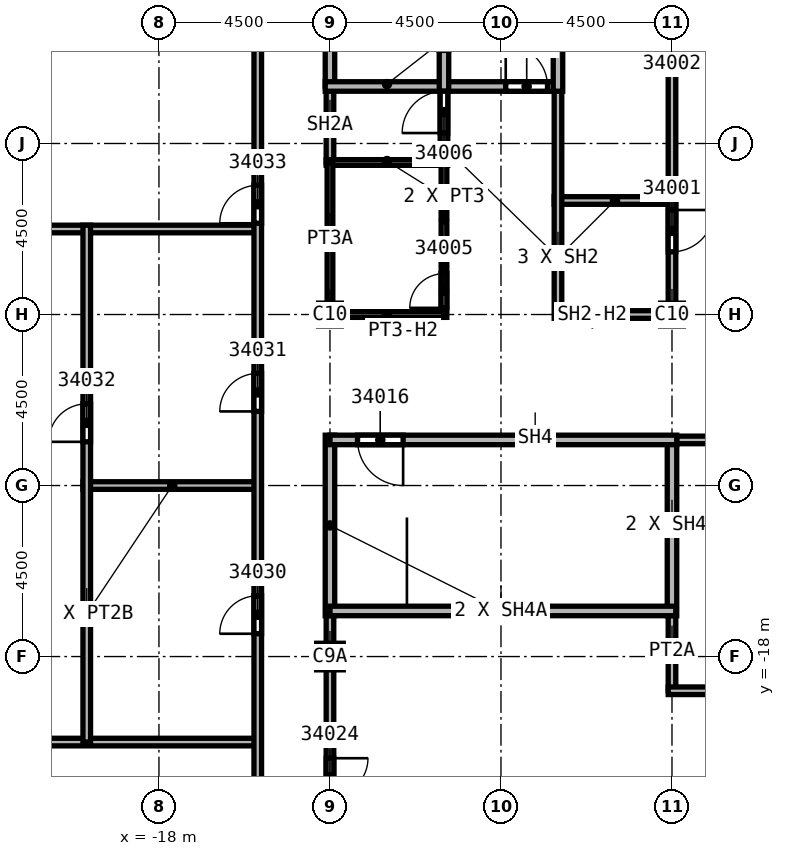
"""IFC4 building model, lengths in metres.
Left out: names, types, materials, properties, quantities, classifications, styles, units other than length and angle.
Written with IfcOpenShell. Run it as: python <this file> out.ifc"""

import sys

from ifc_helpers import new_model, si_unit, direction, frame, frame_2d, origin, origin_2d, place, context, subcontext, project, spatial, rectangle, extrude, element, fill, save


model = new_model("IFC4")
c1 = context("Model", 3, precision=1e-05, world=origin(), true_north=direction((0.0, 1.0)))
c2 = subcontext(c1, "Body", "Model", "MODEL_VIEW")
j1 = project(units=[si_unit("LENGTHUNIT", "METRE"), si_unit("PLANEANGLEUNIT", "RADIAN")], contexts=[c1])
p1 = place(None, origin())
s1 = spatial("IfcSite", under=j1, at=p1, CompositionType="ELEMENT")
p2 = place(p1, origin())
s2 = spatial("IfcBuilding", under=s1, at=p2, CompositionType="ELEMENT")
p3 = place(p2, frame((0.0, 0.0, 366.0)))
s3 = spatial("IfcBuildingStorey", under=s2, at=p3, CompositionType="ELEMENT", Elevation=366.0)
p4 = place(p3, frame((-13.5, -18.0, 0.0), z_axis=(0.0, 0.0, 1.0), x_axis=(1.0, 0.0, 0.0)))
e1 = element("IfcColumn", 1, at=p4, inside=s3, PredefinedType="COLUMN", context=c2, shape_type="SweptSolid", body=[
    extrude(rectangle(XDim=0.7, YDim=0.7, at=origin_2d()), origin(), (0.0, 0.0, 1.0), 9.532),
])
for number, where, z_axis, x_axis in (
    (2, (-4.5, -9.0, 0.0), (0.0, 0.0, 1.0), (1.0, 0.0, 0.0)),
    (3, (-13.5, -9.0, 0.0), (0.0, 0.0, 1.0), (1.0, 0.0, 0.0)),
):
    element("IfcColumn", number, at=place(p3, frame(where, z_axis=z_axis, x_axis=x_axis)), inside=s3, PredefinedType="COLUMN", context=c2, shape_type="SweptSolid", body=[
        extrude(rectangle(XDim=0.6, YDim=0.6, at=origin_2d()), origin(), (0.0, 0.0, 1.0), 9.6),
    ])
p5 = place(p3, frame((-26.736, -6.75, 0.0), z_axis=(0.0, 0.0, 1.0), x_axis=(1.0, 0.0, 0.0)))
e4 = element("IfcWall", 4, at=p5, inside=s3, PredefinedType="PARTITIONING", context=c2, shape_type="SweptSolid", body=[
    extrude(rectangle(XDim=11.336, YDim=0.2, at=frame_2d((5.668, 0.0))), origin(), (0.0, 0.0, 1.0), 9.115),
])
p6 = place(p3, frame((-24.486, -20.25, 0.0), z_axis=(0.0, 0.0, 1.0), x_axis=(1.0, 0.0, 0.0)))
e5 = element("IfcWall", 5, at=p6, inside=s3, PredefinedType="PARTITIONING", context=c2, shape_type="SweptSolid", body=[
    extrude(rectangle(XDim=9.086, YDim=0.2, at=frame_2d((4.543, 0.0))), origin(), (0.0, 0.0, 1.0), 5.76),
])
p7 = place(p3, frame((-20.0, -13.5, 0.0), z_axis=(0.0, 0.0, 1.0), x_axis=(1.0, 0.0, 0.0)))
e6 = element("IfcWall", 6, at=p7, inside=s3, PredefinedType="PARTITIONING", context=c2, shape_type="SweptSolid", body=[
    extrude(rectangle(XDim=4.6, YDim=0.2, at=frame_2d((2.3, 0.0))), origin(), (0.0, 0.0, 1.0), 9.115),
])
p8 = place(p3, frame((-19.9, -20.25, 0.0), z_axis=(0.0, 0.0, 1.0), x_axis=(0.0, 1.0, 0.0)))
e7 = element("IfcWall", 7, at=p8, inside=s3, PredefinedType="PARTITIONING", context=c2, shape_type="SweptSolid", body=[
    extrude(rectangle(XDim=13.6, YDim=0.2, at=frame_2d((6.8, 0.0))), origin(), (0.0, 0.0, 1.0), 9.115),
])
p9 = place(p8, frame((7.9, 0.0, 0.0)))
e8 = element("IfcOpeningElement", 8, at=p9, cuts=e7, PredefinedType="OPENING", context=c2, shape_type="SweptSolid", body=[
    extrude(rectangle(XDim=1.0, YDim=2.1, at=frame_2d((0.5, 1.05))), frame((0.0, 0.1, 0.0), z_axis=(0.0, -1.0, 0.0), x_axis=(1.0, 0.0, 0.0)), (0.0, 0.0, 1.0), 0.2),
])
p10 = place(p3, frame((-15.4, -27.45, 0.0), z_axis=(0.0, 0.0, 1.0), x_axis=(0.0, 1.0, 0.0)))
e9 = element("IfcWall", 9, at=p10, inside=s3, PredefinedType="PARTITIONING", context=c2, shape_type="SweptSolid", body=[
    extrude(rectangle(XDim=41.05, YDim=0.2, at=frame_2d((20.525, 0.0))), origin(), (0.0, 0.0, 1.0), 5.76),
])
p11 = place(p10, frame((36.45, 0.0, 0.0)))
e10 = element("IfcOpeningElement", 10, at=p11, cuts=e9, PredefinedType="OPENING", context=c2, shape_type="SweptSolid", body=[
    extrude(rectangle(XDim=1.0, YDim=2.1, at=frame_2d((0.5, 1.05))), frame((0.0, 0.1, 0.0), z_axis=(0.0, -1.0, 0.0), x_axis=(1.0, 0.0, 0.0)), (0.0, 0.0, 1.0), 0.2),
])
p12 = place(p10, frame((4.0, 0.0, 0.0)))
e11 = element("IfcOpeningElement", 11, at=p12, cuts=e9, PredefinedType="OPENING", context=c2, shape_type="SweptSolid", body=[
    extrude(rectangle(XDim=1.0, YDim=2.1, at=frame_2d((0.5, 1.05))), frame((0.0, 0.1, 0.0), z_axis=(0.0, -1.0, 0.0), x_axis=(1.0, 0.0, 0.0)), (0.0, 0.0, 1.0), 0.2),
])
p13 = place(p10, frame((10.05, 0.0, 0.0)))
e12 = element("IfcOpeningElement", 12, at=p13, cuts=e9, PredefinedType="OPENING", context=c2, shape_type="SweptSolid", body=[
    extrude(rectangle(XDim=1.0, YDim=2.1, at=frame_2d((0.5, 1.05))), frame((0.0, 0.1, 0.0), z_axis=(0.0, -1.0, 0.0), x_axis=(1.0, 0.0, 0.0)), (0.0, 0.0, 1.0), 0.2),
])
p14 = place(p10, frame((15.9, 0.0, 0.0)))
e13 = element("IfcOpeningElement", 13, at=p14, cuts=e9, PredefinedType="OPENING", context=c2, shape_type="SweptSolid", body=[
    extrude(rectangle(XDim=1.0, YDim=2.1, at=frame_2d((0.5, 1.05))), frame((0.0, 0.1, 0.0), z_axis=(0.0, -1.0, 0.0), x_axis=(1.0, 0.0, 0.0)), (0.0, 0.0, 1.0), 0.2),
])
p15 = place(p10, frame((20.85, 0.0, 0.0)))
e14 = element("IfcOpeningElement", 14, at=p15, cuts=e9, PredefinedType="OPENING", context=c2, shape_type="SweptSolid", body=[
    extrude(rectangle(XDim=1.0, YDim=2.1, at=frame_2d((0.5, 1.05))), frame((0.0, 0.1, 0.0), z_axis=(0.0, -1.0, 0.0), x_axis=(1.0, 0.0, 0.0)), (0.0, 0.0, 1.0), 0.2),
])
p16 = place(p3, frame((-13.5, -16.675, 0.0), z_axis=(0.0, 0.0, 1.0), x_axis=(0.0, -1.0, 0.0)))
e15 = element("IfcWall", 15, at=p16, inside=s3, PredefinedType="PARTITIONING", context=c2, shape_type="SweptSolid", body=[
    extrude(rectangle(XDim=10.775, YDim=0.2, at=frame_2d((5.387, 0.0))), origin(), (0.0, 0.0, 1.0), 4.916),
])
p17 = place(p16, frame((4.0, 0.0, 0.0)))
e16 = element("IfcOpeningElement", 16, at=p17, cuts=e15, PredefinedType="OPENING", context=c2, shape_type="SweptSolid", body=[
    extrude(rectangle(XDim=1.0, YDim=2.1, at=frame_2d((0.5, 1.05))), frame((0.0, 0.1, 0.0), z_axis=(0.0, -1.0, 0.0), x_axis=(1.0, 0.0, 0.0)), (0.0, 0.0, 1.0), 0.2),
])
p18 = place(p3, frame((-4.5, -18.9, 0.0), z_axis=(0.0, 0.0, 1.0), x_axis=(0.0, 1.0, 0.0)))
e17 = element("IfcWall", 17, at=p18, inside=s3, PredefinedType="PARTITIONING", context=c2, shape_type="SweptSolid", body=[
    extrude(rectangle(XDim=2.1, YDim=0.2, at=frame_2d((1.05, 0.0))), origin(), (0.0, 0.0, 1.0), 5.76),
])
p19 = place(p3, frame((4.5, -18.9, 0.0), z_axis=(0.0, 0.0, 1.0), x_axis=(-1.0, 0.0, 0.0)))
e18 = element("IfcWall", 18, at=p19, inside=s3, PredefinedType="PARTITIONING", context=c2, shape_type="SweptSolid", body=[
    extrude(rectangle(XDim=9.1, YDim=0.2, at=frame_2d((4.55, 0.0))), origin(), (0.0, 0.0, 1.0), 5.76),
])
p20 = place(p3, frame((4.625, -12.3, 0.0), z_axis=(0.0, 0.0, 1.0), x_axis=(-1.0, 0.0, 0.0)))
e19 = element("IfcWall", 19, at=p20, inside=s3, PredefinedType="PARTITIONING", context=c2, shape_type="SweptSolid", body=[
    extrude(rectangle(XDim=9.25, YDim=0.2, at=frame_2d((4.625, 0.0))), origin(), (0.0, 0.0, 1.0), 9.15),
])
p21 = place(p20, frame((1.45, 0.0, 0.0)))
e20 = element("IfcOpeningElement", 20, at=p21, cuts=e19, PredefinedType="OPENING", context=c2, shape_type="SweptSolid", body=[
    extrude(rectangle(XDim=1.0, YDim=2.1, at=frame_2d((0.5, 1.05))), frame((0.0, 0.1, 0.0), z_axis=(0.0, -1.0, 0.0), x_axis=(1.0, 0.0, 0.0)), (0.0, 0.0, 1.0), 0.2),
])
p22 = place(p3, frame((-13.5, -5.0, 0.0), z_axis=(0.0, 0.0, 1.0), x_axis=(0.0, 1.0, 0.0)))
e21 = element("IfcWall", 21, at=p22, inside=s3, PredefinedType="SOLIDWALL", context=c2, shape_type="SweptSolid", body=[
    extrude(rectangle(XDim=2.0, YDim=0.2, at=frame_2d((1.0, 0.0))), origin(), (0.0, 0.0, 1.0), 5.76),
])
p23 = place(p3, frame((-10.5, -5.075, 0.0), z_axis=(0.0, 0.0, 1.0), x_axis=(0.0, 1.0, 0.0)))
e22 = element("IfcWall", 22, at=p23, inside=s3, PredefinedType="SOLIDWALL", context=c2, shape_type="SweptSolid", body=[
    extrude(rectangle(XDim=2.2, YDim=0.2, at=frame_2d((1.1, 0.0))), origin(), (0.0, 0.0, 1.0), 9.15),
])
p24 = place(p23, frame((0.85, 0.0, 0.0)))
e23 = element("IfcOpeningElement", 23, at=p24, cuts=e22, PredefinedType="OPENING", context=c2, shape_type="SweptSolid", body=[
    extrude(rectangle(XDim=1.1, YDim=2.1, at=frame_2d((0.55, 1.05))), frame((0.0, 0.1, 0.0), z_axis=(0.0, -1.0, 0.0), x_axis=(1.0, 0.0, 0.0)), (0.0, 0.0, 1.0), 0.2),
])
p25 = place(p3, frame((-7.6, -6.0, 0.0), z_axis=(0.0, 0.0, 1.0), x_axis=(1.0, 0.0, 0.0)))
e24 = element("IfcWall", 24, at=p25, inside=s3, PredefinedType="SOLIDWALL", context=c2, shape_type="SweptSolid", body=[
    extrude(rectangle(XDim=3.2, YDim=0.2, at=frame_2d((1.6, 0.0))), origin(), (0.0, 0.0, 1.0), 9.15),
])
p26 = place(p3, frame((-7.5, -9.1, 0.0), z_axis=(0.0, 0.0, 1.0), x_axis=(0.0, 1.0, 0.0)))
e25 = element("IfcWall", 25, at=p26, inside=s3, PredefinedType="SOLIDWALL", context=c2, shape_type="SweptSolid", body=[
    extrude(rectangle(XDim=6.225, YDim=0.2, at=frame_2d((3.113, 0.0))), origin(), (0.0, 0.0, 1.0), 9.15),
])
p27 = place(p3, frame((-4.5, -9.0, 0.0), z_axis=(0.0, 0.0, 1.0), x_axis=(-1.0, 0.0, 0.0)))
e26 = element("IfcWall", 26, at=p27, inside=s3, PredefinedType="SOLIDWALL", context=c2, shape_type="SweptSolid", body=[
    extrude(rectangle(XDim=3.0, YDim=0.2, at=frame_2d((1.5, 0.0))), origin(), (0.0, 0.0, 1.0), 8.754),
])
p28 = place(p3, frame((-4.5, 9.1, 0.0), z_axis=(0.0, 0.0, 1.0), x_axis=(0.0, -1.0, 0.0)))
e27 = element("IfcWall", 27, at=p28, inside=s3, PredefinedType="SOLIDWALL", context=c2, shape_type="SweptSolid", body=[
    extrude(rectangle(XDim=18.2, YDim=0.2, at=frame_2d((9.1, 0.0))), origin(), (0.0, 0.0, 1.0), 8.838),
])
p29 = place(p28, frame((15.35, 0.0, 0.0)))
e28 = element("IfcOpeningElement", 28, at=p29, cuts=e27, PredefinedType="OPENING", context=c2, shape_type="SweptSolid", body=[
    extrude(rectangle(XDim=1.1, YDim=2.1, at=frame_2d((0.55, 1.05))), frame((0.0, 0.1, 0.0), z_axis=(0.0, -1.0, 0.0), x_axis=(1.0, 0.0, 0.0)), (0.0, 0.0, 1.0), 0.2),
])
p30 = place(p28, frame((9.85, 0.0, 0.0)))
e29 = element("IfcOpeningElement", 29, at=p30, cuts=e27, PredefinedType="OPENING", context=c2, shape_type="SweptSolid", body=[
    extrude(rectangle(XDim=1.1, YDim=2.1, at=frame_2d((0.55, 1.05))), frame((0.0, 0.1, 0.0), z_axis=(0.0, -1.0, 0.0), x_axis=(1.0, 0.0, 0.0)), (0.0, 0.0, 1.0), 0.2),
])
p31 = place(p3, frame((-13.5, -3.0, 0.0), z_axis=(0.0, 0.0, 1.0), x_axis=(0.0, 1.0, 0.0)))
e30 = element("IfcWall", 30, at=p31, inside=s3, PredefinedType="SOLIDWALL", context=c2, shape_type="SweptSolid", body=[
    extrude(rectangle(XDim=6.0, YDim=0.25, at=frame_2d((3.0, 0.0))), origin(), (0.0, 0.0, 1.0), 5.76),
])
p32 = place(p3, frame((-13.625, -3.0, 0.0), z_axis=(0.0, 0.0, 1.0), x_axis=(1.0, 0.0, 0.0)))
e31 = element("IfcWall", 31, at=p32, inside=s3, PredefinedType="SOLIDWALL", context=c2, shape_type="SweptSolid", body=[
    extrude(rectangle(XDim=6.125, YDim=0.25, at=frame_2d((3.062, 0.0))), origin(), (0.0, 0.0, 1.0), 9.15),
])
p33 = place(p32, frame((4.75, 0.0, 0.0)))
e32 = element("IfcOpeningElement", 32, at=p33, cuts=e31, PredefinedType="OPENING", context=c2, shape_type="SweptSolid", body=[
    extrude(rectangle(XDim=1.1, YDim=2.1, at=frame_2d((0.55, 1.05))), frame((0.0, 0.125, 0.0), z_axis=(0.0, -1.0, 0.0), x_axis=(1.0, 0.0, 0.0)), (0.0, 0.0, 1.0), 0.25),
])
p34 = place(p3, frame((-10.5, -3.125, 0.0), z_axis=(0.0, 0.0, 1.0), x_axis=(0.0, 1.0, 0.0)))
e33 = element("IfcWall", 33, at=p34, inside=s3, PredefinedType="SOLIDWALL", context=c2, shape_type="SweptSolid", body=[
    extrude(rectangle(XDim=6.25, YDim=0.25, at=frame_2d((3.125, 0.0))), origin(), (0.0, 0.0, 1.0), 9.15),
])
p35 = place(p34, frame((1.075, 0.0, 0.0)))
e34 = element("IfcOpeningElement", 34, at=p35, cuts=e33, PredefinedType="OPENING", context=c2, shape_type="SweptSolid", body=[
    extrude(rectangle(XDim=1.1, YDim=2.1, at=frame_2d((0.55, 1.05))), frame((0.0, 0.125, 0.0), z_axis=(0.0, -1.0, 0.0), x_axis=(1.0, 0.0, 0.0)), (0.0, 0.0, 1.0), 0.25),
])
p36 = place(p34, frame((4.075, 0.0, 0.0)))
e35 = element("IfcOpeningElement", 35, at=p36, cuts=e33, PredefinedType="OPENING", context=c2, shape_type="SweptSolid", body=[
    extrude(rectangle(XDim=1.1, YDim=2.1, at=frame_2d((0.55, 1.05))), frame((0.0, 0.125, 0.0), z_axis=(0.0, -1.0, 0.0), x_axis=(1.0, 0.0, 0.0)), (0.0, 0.0, 1.0), 0.25),
])
p37 = place(p3, frame((-7.5, -3.125, 0.0), z_axis=(0.0, 0.0, 1.0), x_axis=(0.0, 1.0, 0.0)))
e36 = element("IfcWall", 36, at=p37, inside=s3, PredefinedType="SOLIDWALL", context=c2, shape_type="SweptSolid", body=[
    extrude(rectangle(XDim=6.25, YDim=0.25, at=frame_2d((3.125, 0.0))), origin(), (0.0, 0.0, 1.0), 9.15),
])
p38 = place(p3, frame((-13.5, -12.175, 0.0), z_axis=(0.0, 0.0, 1.0), x_axis=(0.0, -1.0, 0.0)))
e37 = element("IfcWall", 37, at=p38, inside=s3, PredefinedType="SOLIDWALL", context=c2, shape_type="SweptSolid", body=[
    extrude(rectangle(XDim=4.75, YDim=0.25, at=frame_2d((2.375, 0.0))), origin(), (0.0, 0.0, 1.0), 5.76),
])
p39 = place(p3, frame((-4.5, -12.3, 0.0), z_axis=(0.0, 0.0, 1.0), x_axis=(0.0, -1.0, 0.0)))
e38 = element("IfcWall", 38, at=p39, inside=s3, PredefinedType="SOLIDWALL", context=c2, shape_type="SweptSolid", body=[
    extrude(rectangle(XDim=4.625, YDim=0.25, at=frame_2d((2.312, 0.0))), origin(), (0.0, 0.0, 1.0), 9.744),
])
p40 = place(p3, frame((-4.4, -16.8, 0.0), z_axis=(0.0, 0.0, 1.0), x_axis=(-1.0, 0.0, 0.0)))
e39 = element("IfcWall", 39, at=p40, inside=s3, PredefinedType="SOLIDWALL", context=c2, shape_type="SweptSolid", body=[
    extrude(rectangle(XDim=9.1, YDim=0.25, at=frame_2d((4.55, 0.0))), origin(), (0.0, 0.0, 1.0), 5.76),
])
p41 = place(p3, frame((-4.375, -12.3, 0.0), z_axis=(0.0, 0.0, 1.0), x_axis=(-1.0, 0.0, 0.0)))
e40 = element("IfcWall", 40, at=p41, inside=s3, PredefinedType="SOLIDWALL", context=c2, shape_type="SweptSolid", body=[
    extrude(rectangle(XDim=9.125, YDim=0.25, at=frame_2d((4.562, 0.0))), origin(), (0.0, 0.0, 1.0), 9.15),
])
p42 = place(p41, frame((7.2, 0.0, 0.0)))
e41 = element("IfcOpeningElement", 41, at=p42, cuts=e40, PredefinedType="OPENING", context=c2, shape_type="SweptSolid", body=[
    extrude(rectangle(XDim=1.2, YDim=2.1, at=frame_2d((0.6, 1.05))), frame((0.0, 0.125, 0.0), z_axis=(0.0, -1.0, 0.0), x_axis=(1.0, 0.0, 0.0)), (0.0, 0.0, 1.0), 0.25),
])
p43 = place(p3, frame((-13.6, -5.0, 0.0), z_axis=(0.0, 0.0, 1.0), x_axis=(1.0, 0.0, 0.0)))
e42 = element("IfcWall", 42, at=p43, inside=s3, PredefinedType="PARTITIONING", context=c2, shape_type="SweptSolid", body=[
    extrude(rectangle(XDim=3.1, YDim=0.15, at=frame_2d((1.55, 0.0))), origin(), (0.0, 0.0, 1.0), 9.15),
])
p44 = place(p3, frame((-13.5, -9.075, 0.0), z_axis=(0.0, 0.0, 1.0), x_axis=(0.0, 1.0, 0.0)))
e43 = element("IfcWall", 43, at=p44, inside=s3, PredefinedType="PARTITIONING", context=c2, shape_type="SweptSolid", body=[
    extrude(rectangle(XDim=4.075, YDim=0.15, at=frame_2d((2.038, 0.0))), origin(), (0.0, 0.0, 1.0), 5.76),
])
p45 = place(p3, frame((-10.5, -9.075, 0.0), z_axis=(0.0, 0.0, 1.0), x_axis=(0.0, 1.0, 0.0)))
e44 = element("IfcWall", 44, at=p45, inside=s3, PredefinedType="PARTITIONING", context=c2, shape_type="SweptSolid", body=[
    extrude(rectangle(XDim=4.15, YDim=0.15, at=frame_2d((2.075, 0.0))), origin(), (0.0, 0.0, 1.0), 9.15),
])
p46 = place(p45, frame((0.25, 0.0, 0.0)))
e45 = element("IfcOpeningElement", 45, at=p46, cuts=e44, PredefinedType="OPENING", context=c2, shape_type="SweptSolid", body=[
    extrude(rectangle(XDim=0.9, YDim=2.1, at=frame_2d((0.45, 1.05))), frame((0.0, 0.075, 0.0), z_axis=(0.0, -1.0, 0.0), x_axis=(1.0, 0.0, 0.0)), (0.0, 0.0, 1.0), 0.15),
])
p47 = place(p3, frame((-10.5, -9.0, 0.0), z_axis=(0.0, 0.0, 1.0), x_axis=(-1.0, 0.0, 0.0)))
e46 = element("IfcWall", 46, at=p47, inside=s3, PredefinedType="PARTITIONING", context=c2, shape_type="SweptSolid", body=[
    extrude(rectangle(XDim=3.0, YDim=0.15, at=frame_2d((1.5, 0.0))), origin(), (0.0, 0.0, 1.0), 8.754),
])
p48 = place(p29, origin())
e47 = element("IfcDoor", 47, at=p48, inside=s3, OperationType="SINGLE_SWING_RIGHT", PredefinedType="DOOR", context=c2, shape_type="SweptSolid", body=[
    extrude(rectangle(XDim=1.1, YDim=2.1, at=frame_2d((0.55, 1.05))), frame((0.0, 0.025, 0.0), z_axis=(0.0, -1.0, 0.0), x_axis=(1.0, 0.0, 0.0)), (0.0, 0.0, 1.0), 0.05),
])
fill(e28, e47)
p49 = place(p33, origin())
e48 = element("IfcDoor", 48, at=p49, inside=s3, OperationType="SINGLE_SWING_RIGHT", PredefinedType="DOOR", context=c2, shape_type="SweptSolid", body=[
    extrude(rectangle(XDim=1.1, YDim=2.1, at=frame_2d((0.55, 1.05))), frame((0.0, 0.025, 0.0), z_axis=(0.0, -1.0, 0.0), x_axis=(1.0, 0.0, 0.0)), (0.0, 0.0, 1.0), 0.05),
])
fill(e32, e48)
p50 = place(p46, origin())
e49 = element("IfcDoor", 49, at=p50, inside=s3, OperationType="SINGLE_SWING_RIGHT", PredefinedType="DOOR", context=c2, shape_type="SweptSolid", body=[
    extrude(rectangle(XDim=0.9, YDim=2.1, at=frame_2d((0.45, 1.05))), frame((0.0, 0.025, 0.0), z_axis=(0.0, -1.0, 0.0), x_axis=(1.0, 0.0, 0.0)), (0.0, 0.0, 1.0), 0.05),
])
fill(e45, e49)
p51 = place(p24, origin())
e50 = element("IfcDoor", 50, at=p51, inside=s3, OperationType="SINGLE_SWING_LEFT", PredefinedType="DOOR", context=c2, shape_type="SweptSolid", body=[
    extrude(rectangle(XDim=1.1, YDim=2.1, at=frame_2d((0.55, 1.05))), frame((0.0, 0.025, 0.0), z_axis=(0.0, -1.0, 0.0), x_axis=(1.0, 0.0, 0.0)), (0.0, 0.0, 1.0), 0.05),
])
fill(e23, e50)
p52 = place(p42, origin())
e51 = element("IfcDoor", 51, at=p52, inside=s3, OperationType="SINGLE_SWING_LEFT", PredefinedType="DOOR", context=c2, shape_type="SweptSolid", body=[
    extrude(rectangle(XDim=1.2, YDim=2.1, at=frame_2d((0.6, 1.05))), frame((0.0, 0.025, 0.0), z_axis=(0.0, -1.0, 0.0), x_axis=(1.0, 0.0, 0.0)), (0.0, 0.0, 1.0), 0.05),
])
fill(e41, e51)
p53 = place(p17, origin())
e52 = element("IfcDoor", 52, at=p53, inside=s3, OperationType="SINGLE_SWING_LEFT", PredefinedType="DOOR", context=c2, shape_type="SweptSolid", body=[
    extrude(rectangle(XDim=1.0, YDim=2.1, at=frame_2d((0.5, 1.05))), frame((0.0, 0.025, 0.0), z_axis=(0.0, -1.0, 0.0), x_axis=(1.0, 0.0, 0.0)), (0.0, 0.0, 1.0), 0.05),
])
fill(e16, e52)
p54 = place(p13, origin())
e53 = element("IfcDoor", 53, at=p54, inside=s3, OperationType="SINGLE_SWING_LEFT", PredefinedType="DOOR", context=c2, shape_type="SweptSolid", body=[
    extrude(rectangle(XDim=1.0, YDim=2.1, at=frame_2d((0.5, 1.05))), frame((0.0, 0.025, 0.0), z_axis=(0.0, -1.0, 0.0), x_axis=(1.0, 0.0, 0.0)), (0.0, 0.0, 1.0), 0.05),
])
fill(e12, e53)
p55 = place(p14, origin())
e54 = element("IfcDoor", 54, at=p55, inside=s3, OperationType="SINGLE_SWING_RIGHT", PredefinedType="DOOR", context=c2, shape_type="SweptSolid", body=[
    extrude(rectangle(XDim=1.0, YDim=2.1, at=frame_2d((0.5, 1.05))), frame((0.0, 0.025, 0.0), z_axis=(0.0, -1.0, 0.0), x_axis=(1.0, 0.0, 0.0)), (0.0, 0.0, 1.0), 0.05),
])
fill(e13, e54)
p56 = place(p9, origin())
e55 = element("IfcDoor", 55, at=p56, inside=s3, OperationType="SINGLE_SWING_LEFT", PredefinedType="DOOR", context=c2, shape_type="SweptSolid", body=[
    extrude(rectangle(XDim=1.0, YDim=2.1, at=frame_2d((0.5, 1.05))), frame((0.0, 0.025, 0.0), z_axis=(0.0, -1.0, 0.0), x_axis=(1.0, 0.0, 0.0)), (0.0, 0.0, 1.0), 0.05),
])
fill(e8, e55)
p57 = place(p15, origin())
e56 = element("IfcDoor", 56, at=p57, inside=s3, OperationType="SINGLE_SWING_RIGHT", PredefinedType="DOOR", context=c2, shape_type="SweptSolid", body=[
    extrude(rectangle(XDim=1.0, YDim=2.1, at=frame_2d((0.5, 1.05))), frame((0.0, 0.025, 0.0), z_axis=(0.0, -1.0, 0.0), x_axis=(1.0, 0.0, 0.0)), (0.0, 0.0, 1.0), 0.05),
])
fill(e14, e56)
save(model, sys.argv[1])
